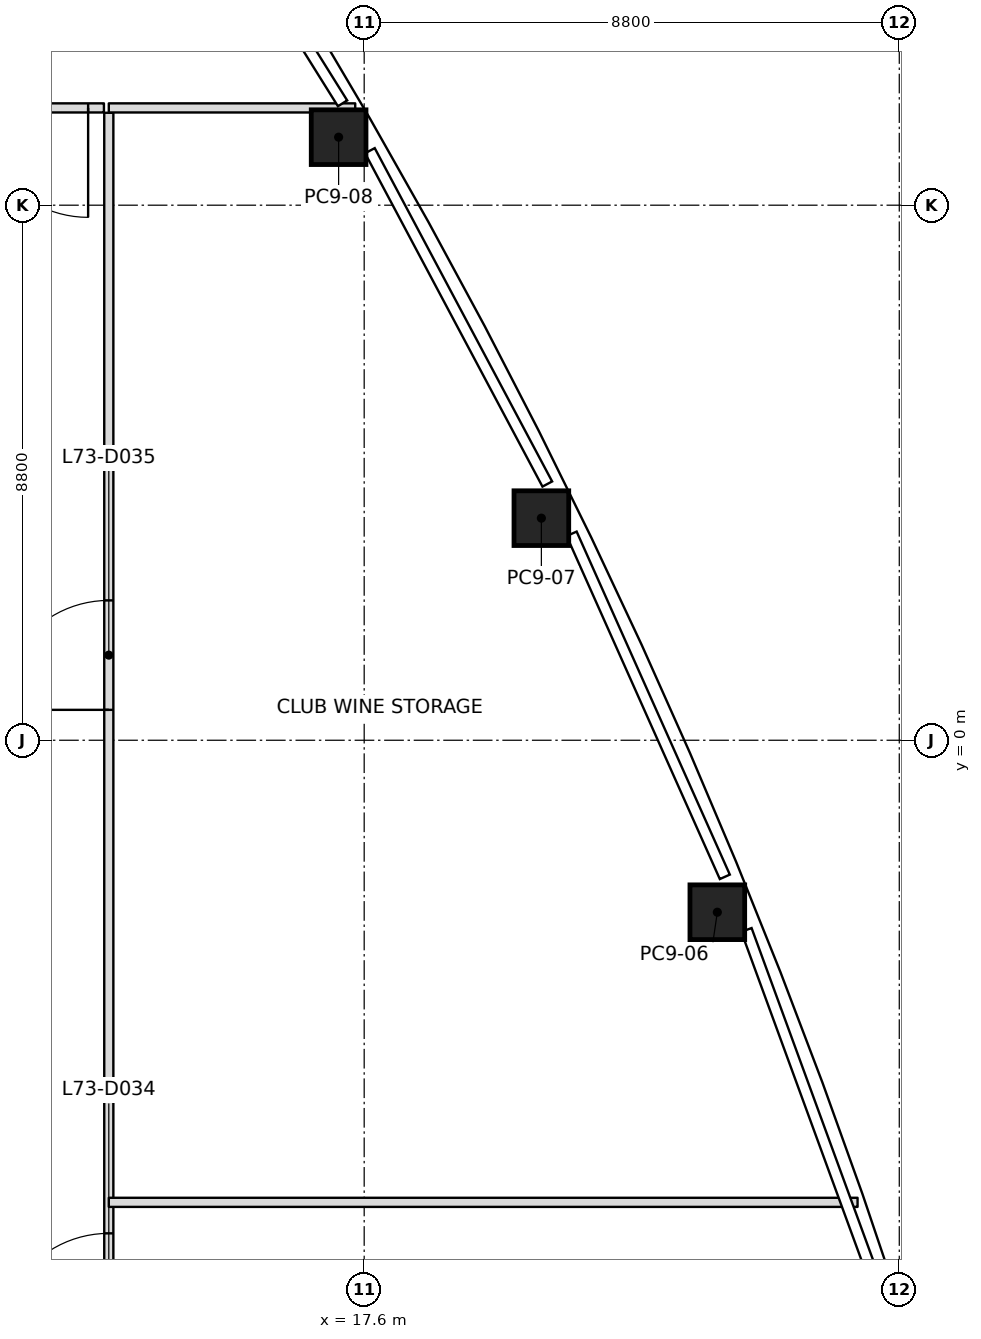
"""IFC4 building model, lengths in metres.
Left out: names, types, materials, properties, quantities, classifications, styles, units other than length and angle.
Written with IfcOpenShell. Run it as: python <this file> out.ifc"""

import sys

from ifc_helpers import new_model, si_unit, direction, frame, frame_2d, origin, origin_2d, place, context, subcontext, project, spatial, rectangle, extrude, clip, halfspace, element, fill, save


model = new_model("IFC4")
c1 = context("Model", 3, precision=1e-05, world=origin(), true_north=direction((0.0, 1.0)))
c2 = subcontext(c1, "Body", "Model", "MODEL_VIEW")
j1 = project(units=[si_unit("LENGTHUNIT", "METRE"), si_unit("PLANEANGLEUNIT", "RADIAN")], contexts=[c1])
p1 = place(None, origin())
s1 = spatial("IfcSite", under=j1, at=p1, CompositionType="ELEMENT")
p2 = place(p1, origin())
s2 = spatial("IfcBuilding", under=s1, at=p2, CompositionType="ELEMENT")
p3 = place(p2, frame((0.0, 0.0, 319.0)))
s3 = spatial("IfcBuildingStorey", under=s2, at=p3, CompositionType="ELEMENT", Elevation=319.0)
p4 = place(p3, frame((23.408, -2.829, 0.0), z_axis=(-0.013110014455, 0.007323525316, 0.999887240392), x_axis=(-0.375868515829, 0.926598952698, -0.011714933535)))
e1 = element("IfcColumn", 1, at=p4, inside=s3, PredefinedType="COLUMN", context=c2, shape_type="SweptSolid", body=[
    clip(clip(extrude(rectangle(XDim=0.9, YDim=0.9, at=origin_2d()), origin(), (0.0, 0.0, 1.0), 5.4), halfspace(frame((0.0, 0.0, 0.002)), True)), halfspace(frame((0.0, 0.0, 5.4)), False)),
])
p5 = place(p3, frame((20.514, 3.653, 0.0), z_axis=(-0.010398197164, 0.001446705692, 0.999944890751), x_axis=(-0.438974783075, 0.898480241879, -0.005864706024)))
e2 = element("IfcColumn", 2, at=p5, inside=s3, PredefinedType="COLUMN", context=c2, shape_type="SweptSolid", body=[
    clip(clip(extrude(rectangle(XDim=0.9, YDim=0.9, at=origin_2d()), origin(), (0.0, 0.0, 1.0), 5.4), halfspace(frame((0.0, 0.0, 0.001)), True)), halfspace(frame((0.0, 0.0, 5.4)), False)),
])
p6 = place(p3, frame((17.179, 9.919, 0.0), z_axis=(-0.007324088614, -0.004249779813, 0.999964147906), x_axis=(-0.499986589252, 0.866033146147, 1.850476e-05)))
e3 = element("IfcColumn", 3, at=p6, inside=s3, PredefinedType="COLUMN", context=c2, shape_type="SweptSolid", body=[
    clip(extrude(rectangle(XDim=0.9, YDim=0.9, at=origin_2d()), origin(), (0.0, 0.0, 1.0), 5.4), halfspace(frame((0.0, 0.0, 0.001)), True)),
])
p7 = place(p3, frame((13.4, -7.6, 0.0), z_axis=(0.0, 0.0, 1.0), x_axis=(1.0, 0.0, 0.0)))
e4 = element("IfcWall", 4, at=p7, inside=s3, PredefinedType="PARTITIONING", context=c2, shape_type="SweptSolid", body=[
    extrude(rectangle(XDim=12.314, YDim=0.15, at=frame_2d((6.157, 0.0))), origin(), (0.0, 0.0, 1.0), 4.533),
])
p8 = place(p3, frame((17.453, 10.4, 0.0), z_axis=(0.0, 0.0, 1.0), x_axis=(-1.0, 0.0, 0.0)))
e5 = element("IfcWall", 5, at=p8, inside=s3, PredefinedType="PARTITIONING", context=c2, shape_type="SweptSolid", body=[
    extrude(rectangle(XDim=4.053, YDim=0.15, at=frame_2d((2.026, 0.0))), origin(), (0.0, 0.0, 1.0), 4.533),
])
p9 = place(p3, frame((13.32, 10.4, 0.0), z_axis=(0.0, 0.0, 1.0), x_axis=(-1.0, 0.0, 0.0)))
e6 = element("IfcWall", 6, at=p9, inside=s3, PredefinedType="PARTITIONING", context=c2, shape_type="SweptSolid", body=[
    extrude(rectangle(XDim=26.64, YDim=0.15, at=frame_2d((13.32, 0.0))), origin(), (0.0, 0.0, 1.0), 4.538),
])
p10 = place(p9, frame((4.12, 0.0, 0.0)))
e7 = element("IfcOpeningElement", 7, at=p10, cuts=e6, PredefinedType="OPENING", context=c2, shape_type="SweptSolid", body=[
    extrude(rectangle(XDim=1.0, YDim=2.1, at=frame_2d((0.5, 1.05))), frame((0.0, 0.075, 0.0), z_axis=(0.0, -1.0, 0.0), x_axis=(1.0, 0.0, 0.0)), (0.0, 0.0, 1.0), 0.15),
])
p11 = place(p9, frame((0.26, 0.0, 0.0)))
e8 = element("IfcOpeningElement", 8, at=p11, cuts=e6, PredefinedType="OPENING", context=c2, shape_type="SweptSolid", body=[
    extrude(rectangle(XDim=1.8, YDim=2.1, at=frame_2d((0.9, 1.05))), frame((0.0, 0.075, 0.0), z_axis=(0.0, -1.0, 0.0), x_axis=(1.0, 0.0, 0.0)), (0.0, 0.0, 1.0), 0.15),
])
p12 = place(p9, frame((15.53, 0.0, 0.0)))
e9 = element("IfcOpeningElement", 9, at=p12, cuts=e6, PredefinedType="OPENING", context=c2, shape_type="SweptSolid", body=[
    extrude(rectangle(XDim=2.4, YDim=2.1, at=frame_2d((1.2, 1.05))), frame((0.0, 0.075, 0.0), z_axis=(0.0, -1.0, 0.0), x_axis=(1.0, 0.0, 0.0)), (0.0, 0.0, 1.0), 0.15),
])
p13 = place(p3, frame((13.4, -10.32, 0.0), z_axis=(0.0, 0.0, 1.0), x_axis=(0.0, 1.0, 0.0)))
e10 = element("IfcWall", 10, at=p13, inside=s3, PredefinedType="PARTITIONING", context=c2, shape_type="SweptSolid", body=[
    extrude(rectangle(XDim=20.64, YDim=0.15, at=frame_2d((10.32, 0.0))), origin(), (0.0, 0.0, 1.0), 4.538),
])
p14 = place(p13, frame((0.41, 0.0, 0.0)))
e11 = element("IfcOpeningElement", 11, at=p14, cuts=e10, PredefinedType="OPENING", context=c2, shape_type="SweptSolid", body=[
    extrude(rectangle(XDim=1.8, YDim=2.1, at=frame_2d((0.9, 1.05))), frame((0.0, 0.075, 0.0), z_axis=(0.0, -1.0, 0.0), x_axis=(1.0, 0.0, 0.0)), (0.0, 0.0, 1.0), 0.15),
])
p15 = place(p13, frame((10.82, 0.0, 0.0)))
e12 = element("IfcOpeningElement", 12, at=p15, cuts=e10, PredefinedType="OPENING", context=c2, shape_type="SweptSolid", body=[
    extrude(rectangle(XDim=1.8, YDim=2.1, at=frame_2d((0.9, 1.05))), frame((0.0, 0.075, 0.0), z_axis=(0.0, -1.0, 0.0), x_axis=(1.0, 0.0, 0.0)), (0.0, 0.0, 1.0), 0.15),
])
p16 = place(p11, origin())
e13 = element("IfcDoor", 13, at=p16, inside=s3, OperationType="DOUBLE_DOOR_SINGLE_SWING", PredefinedType="DOOR", context=c2, shape_type="SweptSolid", body=[
    extrude(rectangle(XDim=1.8, YDim=2.1, at=frame_2d((0.9, 1.05))), frame((0.0, 0.025, 0.0), z_axis=(0.0, -1.0, 0.0), x_axis=(1.0, 0.0, 0.0)), (0.0, 0.0, 1.0), 0.05),
])
fill(e8, e13)
p17 = place(p14, origin())
e14 = element("IfcDoor", 14, at=p17, inside=s3, OperationType="DOUBLE_DOOR_SINGLE_SWING", PredefinedType="DOOR", context=c2, shape_type="SweptSolid", body=[
    extrude(rectangle(XDim=1.8, YDim=2.1, at=frame_2d((0.9, 1.05))), frame((0.0, 0.025, 0.0), z_axis=(0.0, -1.0, 0.0), x_axis=(1.0, 0.0, 0.0)), (0.0, 0.0, 1.0), 0.05),
])
fill(e11, e14)
p18 = place(p15, origin())
e15 = element("IfcDoor", 15, at=p18, inside=s3, OperationType="DOUBLE_DOOR_SINGLE_SWING", PredefinedType="DOOR", context=c2, shape_type="SweptSolid", body=[
    extrude(rectangle(XDim=1.8, YDim=2.1, at=frame_2d((0.9, 1.05))), frame((0.0, 0.025, 0.0), z_axis=(0.0, -1.0, 0.0), x_axis=(1.0, 0.0, 0.0)), (0.0, 0.0, 1.0), 0.05),
])
fill(e12, e15)
save(model, sys.argv[1])
